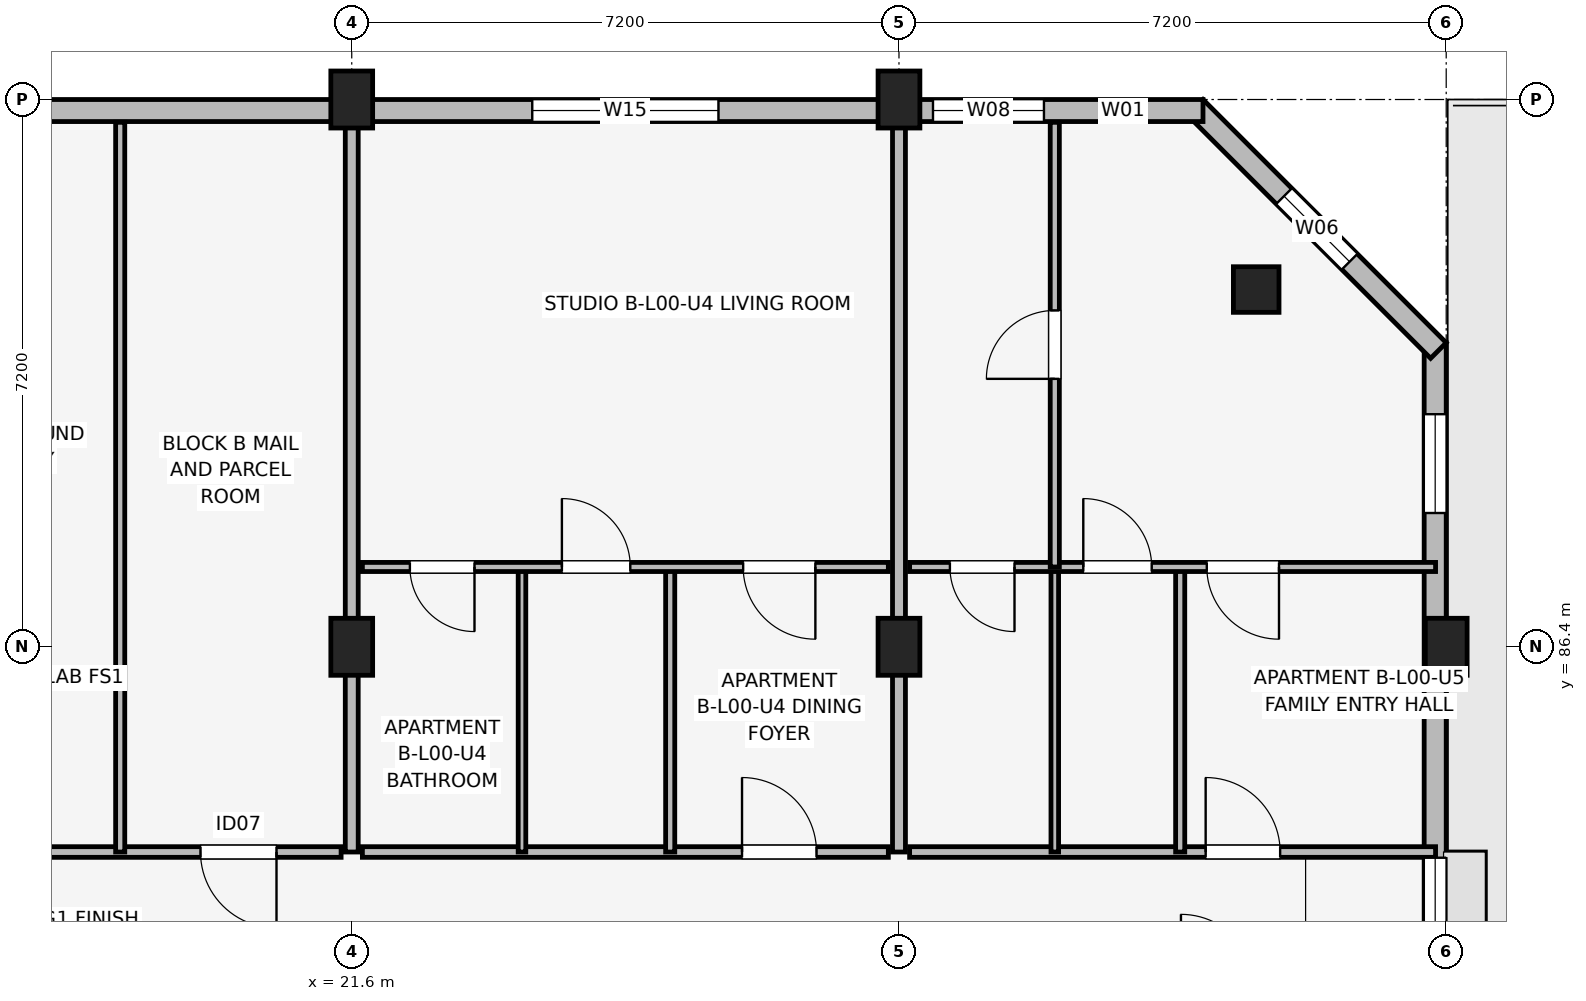
"""IFC4 building model, lengths in metres.
Left out: names, types, materials, properties, quantities, classifications, styles, units other than length and angle.
Written with IfcOpenShell. Run it as: python <this file> out.ifc"""

import sys

from ifc_helpers import new_model, si_unit, direction, frame, frame_2d, origin, origin_2d, place, context, subcontext, project, spatial, rectangle, extrude, element, fill, save


model = new_model("IFC4")
c1 = context("Model", 3, precision=1e-05, world=origin(), true_north=direction((0.0, 1.0)))
c2 = subcontext(c1, "Body", "Model", "MODEL_VIEW")
j1 = project(units=[si_unit("LENGTHUNIT", "METRE"), si_unit("PLANEANGLEUNIT", "RADIAN")], contexts=[c1])
p1 = place(None, origin())
s1 = spatial("IfcSite", under=j1, at=p1, CompositionType="ELEMENT")
p2 = place(p1, origin())
s2 = spatial("IfcBuilding", under=s1, at=p2, CompositionType="ELEMENT")
p3 = place(p2, origin())
s3 = spatial("IfcBuildingStorey", under=s2, at=p3, CompositionType="ELEMENT", Elevation=0.0)
for number, where, z_axis, x_axis in (
    (1, (21.6, 86.4, 0.0), (0.0, 0.0, 1.0), (1.0, 0.0, 0.0)),
    (2, (21.6, 93.6, 0.0), (0.0, 0.0, 1.0), (1.0, 0.0, 0.0)),
    (3, (28.8, 86.4, 0.0), (0.0, 0.0, 1.0), (1.0, 0.0, 0.0)),
    (4, (28.8, 93.6, 0.0), (0.0, 0.0, 1.0), (1.0, 0.0, 0.0)),
    (5, (36.0, 86.4, 0.0), (0.0, 0.0, 1.0), (1.0, 0.0, 0.0)),
):
    element("IfcColumn", number, at=place(p3, frame(where, z_axis=z_axis, x_axis=x_axis)), inside=s3, PredefinedType="COLUMN", context=c2, shape_type="SweptSolid", body=[
        extrude(rectangle(XDim=0.55, YDim=0.75, at=origin_2d()), origin(), (0.0, 0.0, 1.0), 4.5),
    ])
p4 = place(p3, frame((33.5, 91.1, 0.0), z_axis=(0.0, 0.0, 1.0), x_axis=(1.0, 0.0, 0.0)))
e6 = element("IfcColumn", 6, at=p4, inside=s3, PredefinedType="COLUMN", context=c2, shape_type="SweptSolid", body=[
    extrude(rectangle(XDim=0.6, YDim=0.6, at=origin_2d()), origin(), (0.0, 0.0, 1.0), 4.5),
])
p5 = place(p3, frame((35.855, 75.2, 0.0), z_axis=(0.0, 0.0, 1.0), x_axis=(0.0, 1.0, 0.0)))
e7 = element("IfcWall", 7, at=p5, inside=s3, PredefinedType="SOLIDWALL", context=c2, shape_type="SweptSolid", body=[
    extrude(rectangle(XDim=15.2, YDim=0.29, at=frame_2d((7.6, 0.0))), origin(), (0.0, 0.0, 1.0), 3.48),
])
p6 = place(p5, frame((6.775, 0.0, 1.05)))
e8 = element("IfcOpeningElement", 8, at=p6, cuts=e7, PredefinedType="OPENING", context=c2, shape_type="SweptSolid", body=[
    extrude(rectangle(XDim=1.65, YDim=1.15, at=frame_2d((0.825, 0.575))), frame((0.0, 0.155, 0.0), z_axis=(0.0, -1.0, 0.0), x_axis=(1.0, 0.0, 0.0)), (0.0, 0.0, 1.0), 0.31),
])
p7 = place(p5, frame((12.96, 0.0, 0.75)))
e9 = element("IfcOpeningElement", 9, at=p7, cuts=e7, PredefinedType="OPENING", context=c2, shape_type="SweptSolid", body=[
    extrude(rectangle(XDim=1.3, YDim=1.55, at=frame_2d((0.65, 0.775))), frame((0.0, 0.155, 0.0), z_axis=(0.0, -1.0, 0.0), x_axis=(1.0, 0.0, 0.0)), (0.0, 0.0, 1.0), 0.31),
])
p8 = place(p3, frame((35.897, 90.298, 0.0), z_axis=(0.0, 0.0, 1.0), x_axis=(-0.707106781187, 0.707106781187, 0.0)))
e10 = element("IfcWall", 10, at=p8, inside=s3, PredefinedType="SOLIDWALL", context=c2, shape_type="SweptSolid", body=[
    extrude(rectangle(XDim=4.525, YDim=0.29, at=frame_2d((2.263, 0.0))), origin(), (0.0, 0.0, 1.0), 4.175),
])
p9 = place(p8, frame((1.653, 0.0, 0.85)))
e11 = element("IfcOpeningElement", 11, at=p9, cuts=e10, PredefinedType="OPENING", context=c2, shape_type="SweptSolid", body=[
    extrude(rectangle(XDim=1.22, YDim=1.5, at=frame_2d((0.61, 0.75))), frame((0.0, 0.155, 0.0), z_axis=(0.0, -1.0, 0.0), x_axis=(1.0, 0.0, 0.0)), (0.0, 0.0, 1.0), 0.31),
])
p10 = place(p3, frame((32.8, 93.455, 0.0), z_axis=(0.0, 0.0, 1.0), x_axis=(-1.0, 0.0, 0.0)))
e12 = element("IfcWall", 12, at=p10, inside=s3, PredefinedType="SOLIDWALL", context=c2, shape_type="SweptSolid", body=[
    extrude(rectangle(XDim=29.6, YDim=0.29, at=frame_2d((14.8, 0.0))), origin(), (0.0, 0.0, 1.0), 3.48),
])
p11 = place(p10, frame((17.25, 0.0, 0.0), z_axis=(0.0, 0.0, 1.0), x_axis=(-1.0, 0.0, 0.0)))
e13 = element("IfcOpeningElement", 13, at=p11, cuts=e12, PredefinedType="OPENING", context=c2, shape_type="SweptSolid", body=[
    extrude(rectangle(XDim=1.8, YDim=2.4, at=frame_2d((0.9, 1.2))), frame((0.0, 0.155, 0.0), z_axis=(0.0, -1.0, 0.0), x_axis=(1.0, 0.0, 0.0)), (0.0, 0.0, 1.0), 0.31),
])
p12 = place(p10, frame((26.157, 0.0, 0.75)))
e14 = element("IfcOpeningElement", 14, at=p12, cuts=e12, PredefinedType="OPENING", context=c2, shape_type="SweptSolid", body=[
    extrude(rectangle(XDim=0.98, YDim=1.45, at=frame_2d((0.49, 0.725))), frame((0.0, 0.155, 0.0), z_axis=(0.0, -1.0, 0.0), x_axis=(1.0, 0.0, 0.0)), (0.0, 0.0, 1.0), 0.31),
])
p13 = place(p10, frame((23.778, 0.0, 0.75)))
e15 = element("IfcOpeningElement", 15, at=p13, cuts=e12, PredefinedType="OPENING", context=c2, shape_type="SweptSolid", body=[
    extrude(rectangle(XDim=1.1, YDim=1.5, at=frame_2d((0.55, 0.75))), frame((0.0, 0.155, 0.0), z_axis=(0.0, -1.0, 0.0), x_axis=(1.0, 0.0, 0.0)), (0.0, 0.0, 1.0), 0.31),
])
p14 = place(p10, frame((19.883, 0.0, 0.7)))
e16 = element("IfcOpeningElement", 16, at=p14, cuts=e12, PredefinedType="OPENING", context=c2, shape_type="SweptSolid", body=[
    extrude(rectangle(XDim=2.3, YDim=1.65, at=frame_2d((1.15, 0.825))), frame((0.0, 0.155, 0.0), z_axis=(0.0, -1.0, 0.0), x_axis=(1.0, 0.0, 0.0)), (0.0, 0.0, 1.0), 0.31),
])
p15 = place(p10, frame((6.375, 0.0, 0.7)))
e17 = element("IfcOpeningElement", 17, at=p15, cuts=e12, PredefinedType="OPENING", context=c2, shape_type="SweptSolid", body=[
    extrude(rectangle(XDim=2.45, YDim=1.65, at=frame_2d((1.225, 0.825))), frame((0.0, 0.155, 0.0), z_axis=(0.0, -1.0, 0.0), x_axis=(1.0, 0.0, 0.0)), (0.0, 0.0, 1.0), 0.31),
])
p16 = place(p10, frame((2.093, 0.0, 0.75)))
e18 = element("IfcOpeningElement", 18, at=p16, cuts=e12, PredefinedType="OPENING", context=c2, shape_type="SweptSolid", body=[
    extrude(rectangle(XDim=1.46, YDim=1.55, at=frame_2d((0.73, 0.775))), frame((0.0, 0.155, 0.0), z_axis=(0.0, -1.0, 0.0), x_axis=(1.0, 0.0, 0.0)), (0.0, 0.0, 1.0), 0.31),
])
p17 = place(p10, frame((0.755, 0.0, 0.75)))
e19 = element("IfcOpeningElement", 19, at=p17, cuts=e12, PredefinedType="OPENING", context=c2, shape_type="SweptSolid", body=[
    extrude(rectangle(XDim=0.6, YDim=1.25, at=frame_2d((0.3, 0.625))), frame((0.0, 0.155, 0.0), z_axis=(0.0, -1.0, 0.0), x_axis=(1.0, 0.0, 0.0)), (0.0, 0.0, 1.0), 0.31),
])
p18 = place(p3, frame((14.54, 83.7, 0.0), z_axis=(0.0, 0.0, 1.0), x_axis=(1.0, 0.0, 0.0)))
e20 = element("IfcWall", 20, at=p18, inside=s3, PredefinedType="PARTITIONING", context=c2, shape_type="SweptSolid", body=[
    extrude(rectangle(XDim=6.92, YDim=0.14, at=frame_2d((3.46, 0.0))), origin(), (0.0, 0.0, 1.0), 3.15),
])
p19 = place(p18, frame((1.25, 0.0, 0.0)))
e21 = element("IfcOpeningElement", 21, at=p19, cuts=e20, PredefinedType="OPENING", context=c2, shape_type="SweptSolid", body=[
    extrude(rectangle(XDim=1.4, YDim=2.22, at=frame_2d((0.7, 1.11))), frame((0.0, 0.08, 0.0), z_axis=(0.0, -1.0, 0.0), x_axis=(1.0, 0.0, 0.0)), (0.0, 0.0, 1.0), 0.16),
])
p20 = place(p18, frame((6.07, 0.0, 0.0), z_axis=(0.0, 0.0, 1.0), x_axis=(-1.0, 0.0, 0.0)))
e22 = element("IfcOpeningElement", 22, at=p20, cuts=e20, PredefinedType="OPENING", context=c2, shape_type="SweptSolid", body=[
    extrude(rectangle(XDim=1.0, YDim=2.12, at=frame_2d((0.5, 1.06))), frame((0.0, 0.08, 0.0), z_axis=(0.0, -1.0, 0.0), x_axis=(1.0, 0.0, 0.0)), (0.0, 0.0, 1.0), 0.16),
])
p21 = place(p3, frame((18.554, 83.7, 0.0), z_axis=(0.0, 0.0, 1.0), x_axis=(0.0, 1.0, 0.0)))
e23 = element("IfcWall", 23, at=p21, inside=s3, PredefinedType="PARTITIONING", context=c2, shape_type="SweptSolid", body=[
    extrude(rectangle(XDim=9.6, YDim=0.12, at=frame_2d((4.8, 0.0))), origin(), (0.0, 0.0, 1.0), 3.15),
])
p22 = place(p3, frame((21.6, 83.7, 0.0), z_axis=(0.0, 0.0, 1.0), x_axis=(0.0, 1.0, 0.0)))
e24 = element("IfcWall", 24, at=p22, inside=s3, PredefinedType="PARTITIONING", context=c2, shape_type="SweptSolid", body=[
    extrude(rectangle(XDim=9.6, YDim=0.17, at=frame_2d((4.8, 0.0))), origin(), (0.0, 0.0, 1.0), 3.15),
])
p23 = place(p3, frame((21.74, 83.7, 0.0), z_axis=(0.0, 0.0, 1.0), x_axis=(1.0, 0.0, 0.0)))
e25 = element("IfcWall", 25, at=p23, inside=s3, PredefinedType="PARTITIONING", context=c2, shape_type="SweptSolid", body=[
    extrude(rectangle(XDim=6.92, YDim=0.14, at=frame_2d((3.46, 0.0))), origin(), (0.0, 0.0, 1.0), 3.15),
])
p24 = place(p23, frame((4.995, 0.0, 0.0)))
e26 = element("IfcOpeningElement", 26, at=p24, cuts=e25, PredefinedType="OPENING", context=c2, shape_type="SweptSolid", body=[
    extrude(rectangle(XDim=0.98, YDim=2.1, at=frame_2d((0.49, 1.05))), frame((0.0, 0.08, 0.0), z_axis=(0.0, -1.0, 0.0), x_axis=(1.0, 0.0, 0.0)), (0.0, 0.0, 1.0), 0.16),
])
p25 = place(p3, frame((23.84, 83.7, 0.0), z_axis=(0.0, 0.0, 1.0), x_axis=(0.0, 1.0, 0.0)))
e27 = element("IfcWall", 27, at=p25, inside=s3, PredefinedType="PARTITIONING", context=c2, shape_type="SweptSolid", body=[
    extrude(rectangle(XDim=3.75, YDim=0.1, at=frame_2d((1.875, 0.0))), origin(), (0.0, 0.0, 1.0), 3.15),
])
p26 = place(p3, frame((25.79, 83.7, 0.0), z_axis=(0.0, 0.0, 1.0), x_axis=(0.0, 1.0, 0.0)))
e28 = element("IfcWall", 28, at=p26, inside=s3, PredefinedType="PARTITIONING", context=c2, shape_type="SweptSolid", body=[
    extrude(rectangle(XDim=3.75, YDim=0.12, at=frame_2d((1.875, 0.0))), origin(), (0.0, 0.0, 1.0), 3.15),
])
p27 = place(p3, frame((21.74, 87.45, 0.0), z_axis=(0.0, 0.0, 1.0), x_axis=(1.0, 0.0, 0.0)))
e29 = element("IfcWall", 29, at=p27, inside=s3, PredefinedType="PARTITIONING", context=c2, shape_type="SweptSolid", body=[
    extrude(rectangle(XDim=6.92, YDim=0.12, at=frame_2d((3.46, 0.0))), origin(), (0.0, 0.0, 1.0), 3.15),
])
p28 = place(p27, frame((1.475, 0.0, 0.0), z_axis=(0.0, 0.0, 1.0), x_axis=(-1.0, 0.0, 0.0)))
e30 = element("IfcOpeningElement", 30, at=p28, cuts=e29, PredefinedType="OPENING", context=c2, shape_type="SweptSolid", body=[
    extrude(rectangle(XDim=0.85, YDim=2.08, at=frame_2d((0.425, 1.04))), frame((0.0, 0.07, 0.0), z_axis=(0.0, -1.0, 0.0), x_axis=(1.0, 0.0, 0.0)), (0.0, 0.0, 1.0), 0.14),
])
p29 = place(p27, frame((2.625, 0.0, 0.0)))
e31 = element("IfcOpeningElement", 31, at=p29, cuts=e29, PredefinedType="OPENING", context=c2, shape_type="SweptSolid", body=[
    extrude(rectangle(XDim=0.9, YDim=2.08, at=frame_2d((0.45, 1.04))), frame((0.0, 0.07, 0.0), z_axis=(0.0, -1.0, 0.0), x_axis=(1.0, 0.0, 0.0)), (0.0, 0.0, 1.0), 0.14),
])
p30 = place(p27, frame((5.96, 0.0, 0.0), z_axis=(0.0, 0.0, 1.0), x_axis=(-1.0, 0.0, 0.0)))
e32 = element("IfcOpeningElement", 32, at=p30, cuts=e29, PredefinedType="OPENING", context=c2, shape_type="SweptSolid", body=[
    extrude(rectangle(XDim=0.95, YDim=2.08, at=frame_2d((0.475, 1.04))), frame((0.0, 0.07, 0.0), z_axis=(0.0, -1.0, 0.0), x_axis=(1.0, 0.0, 0.0)), (0.0, 0.0, 1.0), 0.14),
])
p31 = place(p3, frame((28.8, 83.7, 0.0), z_axis=(0.0, 0.0, 1.0), x_axis=(0.0, 1.0, 0.0)))
e33 = element("IfcWall", 33, at=p31, inside=s3, PredefinedType="PARTITIONING", context=c2, shape_type="SweptSolid", body=[
    extrude(rectangle(XDim=9.6, YDim=0.17, at=frame_2d((4.8, 0.0))), origin(), (0.0, 0.0, 1.0), 3.15),
])
p32 = place(p3, frame((28.94, 83.7, 0.0), z_axis=(0.0, 0.0, 1.0), x_axis=(1.0, 0.0, 0.0)))
e34 = element("IfcWall", 34, at=p32, inside=s3, PredefinedType="PARTITIONING", context=c2, shape_type="SweptSolid", body=[
    extrude(rectangle(XDim=6.92, YDim=0.14, at=frame_2d((3.46, 0.0))), origin(), (0.0, 0.0, 1.0), 3.15),
])
p33 = place(p32, frame((3.895, 0.0, 0.0)))
e35 = element("IfcOpeningElement", 35, at=p33, cuts=e34, PredefinedType="OPENING", context=c2, shape_type="SweptSolid", body=[
    extrude(rectangle(XDim=0.98, YDim=2.1, at=frame_2d((0.49, 1.05))), frame((0.0, 0.08, 0.0), z_axis=(0.0, -1.0, 0.0), x_axis=(1.0, 0.0, 0.0)), (0.0, 0.0, 1.0), 0.16),
])
p34 = place(p3, frame((30.85, 83.7, 0.0), z_axis=(0.0, 0.0, 1.0), x_axis=(0.0, 1.0, 0.0)))
e36 = element("IfcWall", 36, at=p34, inside=s3, PredefinedType="PARTITIONING", context=c2, shape_type="SweptSolid", body=[
    extrude(rectangle(XDim=3.75, YDim=0.1, at=frame_2d((1.875, 0.0))), origin(), (0.0, 0.0, 1.0), 3.15),
])
p35 = place(p3, frame((32.5, 83.7, 0.0), z_axis=(0.0, 0.0, 1.0), x_axis=(0.0, 1.0, 0.0)))
e37 = element("IfcWall", 37, at=p35, inside=s3, PredefinedType="PARTITIONING", context=c2, shape_type="SweptSolid", body=[
    extrude(rectangle(XDim=3.75, YDim=0.12, at=frame_2d((1.875, 0.0))), origin(), (0.0, 0.0, 1.0), 3.15),
])
p36 = place(p3, frame((28.94, 87.45, 0.0), z_axis=(0.0, 0.0, 1.0), x_axis=(1.0, 0.0, 0.0)))
e38 = element("IfcWall", 38, at=p36, inside=s3, PredefinedType="PARTITIONING", context=c2, shape_type="SweptSolid", body=[
    extrude(rectangle(XDim=6.92, YDim=0.12, at=frame_2d((3.46, 0.0))), origin(), (0.0, 0.0, 1.0), 3.15),
])
p37 = place(p36, frame((1.38, 0.0, 0.0), z_axis=(0.0, 0.0, 1.0), x_axis=(-1.0, 0.0, 0.0)))
e39 = element("IfcOpeningElement", 39, at=p37, cuts=e38, PredefinedType="OPENING", context=c2, shape_type="SweptSolid", body=[
    extrude(rectangle(XDim=0.85, YDim=2.08, at=frame_2d((0.425, 1.04))), frame((0.0, 0.07, 0.0), z_axis=(0.0, -1.0, 0.0), x_axis=(1.0, 0.0, 0.0)), (0.0, 0.0, 1.0), 0.14),
])
p38 = place(p36, frame((2.285, 0.0, 0.0)))
e40 = element("IfcOpeningElement", 40, at=p38, cuts=e38, PredefinedType="OPENING", context=c2, shape_type="SweptSolid", body=[
    extrude(rectangle(XDim=0.9, YDim=2.08, at=frame_2d((0.45, 1.04))), frame((0.0, 0.07, 0.0), z_axis=(0.0, -1.0, 0.0), x_axis=(1.0, 0.0, 0.0)), (0.0, 0.0, 1.0), 0.14),
])
p39 = place(p36, frame((4.86, 0.0, 0.0), z_axis=(0.0, 0.0, 1.0), x_axis=(-1.0, 0.0, 0.0)))
e41 = element("IfcOpeningElement", 41, at=p39, cuts=e38, PredefinedType="OPENING", context=c2, shape_type="SweptSolid", body=[
    extrude(rectangle(XDim=0.95, YDim=2.08, at=frame_2d((0.475, 1.04))), frame((0.0, 0.07, 0.0), z_axis=(0.0, -1.0, 0.0), x_axis=(1.0, 0.0, 0.0)), (0.0, 0.0, 1.0), 0.14),
])
p40 = place(p3, frame((30.85, 87.45, 0.0), z_axis=(0.0, 0.0, 1.0), x_axis=(0.0, 1.0, 0.0)))
e42 = element("IfcWall", 42, at=p40, inside=s3, PredefinedType="PARTITIONING", context=c2, shape_type="SweptSolid", body=[
    extrude(rectangle(XDim=5.85, YDim=0.12, at=frame_2d((2.925, 0.0))), origin(), (0.0, 0.0, 1.0), 3.15),
])
p41 = place(p40, frame((2.475, 0.0, 0.0)))
e43 = element("IfcOpeningElement", 43, at=p41, cuts=e42, PredefinedType="OPENING", context=c2, shape_type="SweptSolid", body=[
    extrude(rectangle(XDim=0.9, YDim=2.08, at=frame_2d((0.45, 1.04))), frame((0.0, 0.07, 0.0), z_axis=(0.0, -1.0, 0.0), x_axis=(1.0, 0.0, 0.0)), (0.0, 0.0, 1.0), 0.14),
])
p42 = place(p9, origin())
e44 = element("IfcWindow", 44, at=p42, inside=s3, PartitioningType="SINGLE_PANEL", PredefinedType="WINDOW", context=c2, shape_type="SweptSolid", body=[
    extrude(rectangle(XDim=1.22, YDim=1.5, at=frame_2d((0.61, 0.75))), frame((0.0, 0.03, 0.0), z_axis=(0.0, -1.0, 0.0), x_axis=(1.0, 0.0, 0.0)), (0.0, 0.0, 1.0), 0.06),
])
fill(e11, e44)
p43 = place(p15, origin())
e45 = element("IfcWindow", 45, at=p43, inside=s3, PartitioningType="SINGLE_PANEL", PredefinedType="WINDOW", context=c2, shape_type="SweptSolid", body=[
    extrude(rectangle(XDim=2.45, YDim=1.65, at=frame_2d((1.225, 0.825))), frame((0.0, 0.03, 0.0), z_axis=(0.0, -1.0, 0.0), x_axis=(1.0, 0.0, 0.0)), (0.0, 0.0, 1.0), 0.06),
])
fill(e17, e45)
p44 = place(p16, origin())
e46 = element("IfcWindow", 46, at=p44, inside=s3, PartitioningType="SINGLE_PANEL", PredefinedType="WINDOW", context=c2, shape_type="SweptSolid", body=[
    extrude(rectangle(XDim=1.46, YDim=1.55, at=frame_2d((0.73, 0.775))), frame((0.0, 0.03, 0.0), z_axis=(0.0, -1.0, 0.0), x_axis=(1.0, 0.0, 0.0)), (0.0, 0.0, 1.0), 0.06),
])
fill(e18, e46)
p45 = place(p17, origin())
e47 = element("IfcWindow", 47, at=p45, inside=s3, PartitioningType="SINGLE_PANEL", PredefinedType="WINDOW", context=c2, shape_type="SweptSolid", body=[
    extrude(rectangle(XDim=0.6, YDim=1.25, at=frame_2d((0.3, 0.625))), frame((0.0, 0.03, 0.0), z_axis=(0.0, -1.0, 0.0), x_axis=(1.0, 0.0, 0.0)), (0.0, 0.0, 1.0), 0.06),
])
fill(e19, e47)
p46 = place(p6, origin())
e48 = element("IfcWindow", 48, at=p46, inside=s3, PartitioningType="SINGLE_PANEL", PredefinedType="WINDOW", context=c2, shape_type="SweptSolid", body=[
    extrude(rectangle(XDim=1.65, YDim=1.15, at=frame_2d((0.825, 0.575))), frame((0.0, 0.03, 0.0), z_axis=(0.0, -1.0, 0.0), x_axis=(1.0, 0.0, 0.0)), (0.0, 0.0, 1.0), 0.06),
])
fill(e8, e48)
p47 = place(p7, origin())
e49 = element("IfcWindow", 49, at=p47, inside=s3, PartitioningType="SINGLE_PANEL", PredefinedType="WINDOW", context=c2, shape_type="SweptSolid", body=[
    extrude(rectangle(XDim=1.3, YDim=1.55, at=frame_2d((0.65, 0.775))), frame((0.0, 0.03, 0.0), z_axis=(0.0, -1.0, 0.0), x_axis=(1.0, 0.0, 0.0)), (0.0, 0.0, 1.0), 0.06),
])
fill(e9, e49)
p48 = place(p20, origin())
e50 = element("IfcDoor", 50, at=p48, inside=s3, OperationType="SINGLE_SWING_RIGHT", PredefinedType="DOOR", context=c2, shape_type="SweptSolid", body=[
    extrude(rectangle(XDim=1.0, YDim=2.12, at=frame_2d((0.5, 1.06))), frame((0.0, 0.025, 0.0), z_axis=(0.0, -1.0, 0.0), x_axis=(1.0, 0.0, 0.0)), (0.0, 0.0, 1.0), 0.05),
])
fill(e22, e50)
p49 = place(p24, origin())
e51 = element("IfcDoor", 51, at=p49, inside=s3, OperationType="SINGLE_SWING_LEFT", PredefinedType="DOOR", context=c2, shape_type="SweptSolid", body=[
    extrude(rectangle(XDim=0.98, YDim=2.1, at=frame_2d((0.49, 1.05))), frame((0.0, 0.025, 0.0), z_axis=(0.0, -1.0, 0.0), x_axis=(1.0, 0.0, 0.0)), (0.0, 0.0, 1.0), 0.05),
])
fill(e26, e51)
p50 = place(p28, origin())
e52 = element("IfcDoor", 52, at=p50, inside=s3, OperationType="SINGLE_SWING_RIGHT", PredefinedType="DOOR", context=c2, shape_type="SweptSolid", body=[
    extrude(rectangle(XDim=0.85, YDim=2.08, at=frame_2d((0.425, 1.04))), frame((0.0, 0.025, 0.0), z_axis=(0.0, -1.0, 0.0), x_axis=(1.0, 0.0, 0.0)), (0.0, 0.0, 1.0), 0.05),
])
fill(e30, e52)
p51 = place(p29, origin())
e53 = element("IfcDoor", 53, at=p51, inside=s3, OperationType="SINGLE_SWING_LEFT", PredefinedType="DOOR", context=c2, shape_type="SweptSolid", body=[
    extrude(rectangle(XDim=0.9, YDim=2.08, at=frame_2d((0.45, 1.04))), frame((0.0, 0.025, 0.0), z_axis=(0.0, -1.0, 0.0), x_axis=(1.0, 0.0, 0.0)), (0.0, 0.0, 1.0), 0.05),
])
fill(e31, e53)
p52 = place(p30, origin())
e54 = element("IfcDoor", 54, at=p52, inside=s3, OperationType="SINGLE_SWING_RIGHT", PredefinedType="DOOR", context=c2, shape_type="SweptSolid", body=[
    extrude(rectangle(XDim=0.95, YDim=2.08, at=frame_2d((0.475, 1.04))), frame((0.0, 0.025, 0.0), z_axis=(0.0, -1.0, 0.0), x_axis=(1.0, 0.0, 0.0)), (0.0, 0.0, 1.0), 0.05),
])
fill(e32, e54)
p53 = place(p33, origin())
e55 = element("IfcDoor", 55, at=p53, inside=s3, OperationType="SINGLE_SWING_LEFT", PredefinedType="DOOR", context=c2, shape_type="SweptSolid", body=[
    extrude(rectangle(XDim=0.98, YDim=2.1, at=frame_2d((0.49, 1.05))), frame((0.0, 0.025, 0.0), z_axis=(0.0, -1.0, 0.0), x_axis=(1.0, 0.0, 0.0)), (0.0, 0.0, 1.0), 0.05),
])
fill(e35, e55)
p54 = place(p37, origin())
e56 = element("IfcDoor", 56, at=p54, inside=s3, OperationType="SINGLE_SWING_RIGHT", PredefinedType="DOOR", context=c2, shape_type="SweptSolid", body=[
    extrude(rectangle(XDim=0.85, YDim=2.08, at=frame_2d((0.425, 1.04))), frame((0.0, 0.025, 0.0), z_axis=(0.0, -1.0, 0.0), x_axis=(1.0, 0.0, 0.0)), (0.0, 0.0, 1.0), 0.05),
])
fill(e39, e56)
p55 = place(p38, origin())
e57 = element("IfcDoor", 57, at=p55, inside=s3, OperationType="SINGLE_SWING_LEFT", PredefinedType="DOOR", context=c2, shape_type="SweptSolid", body=[
    extrude(rectangle(XDim=0.9, YDim=2.08, at=frame_2d((0.45, 1.04))), frame((0.0, 0.025, 0.0), z_axis=(0.0, -1.0, 0.0), x_axis=(1.0, 0.0, 0.0)), (0.0, 0.0, 1.0), 0.05),
])
fill(e40, e57)
p56 = place(p39, origin())
e58 = element("IfcDoor", 58, at=p56, inside=s3, OperationType="SINGLE_SWING_RIGHT", PredefinedType="DOOR", context=c2, shape_type="SweptSolid", body=[
    extrude(rectangle(XDim=0.95, YDim=2.08, at=frame_2d((0.475, 1.04))), frame((0.0, 0.025, 0.0), z_axis=(0.0, -1.0, 0.0), x_axis=(1.0, 0.0, 0.0)), (0.0, 0.0, 1.0), 0.05),
])
fill(e41, e58)
p57 = place(p41, origin())
e59 = element("IfcDoor", 59, at=p57, inside=s3, OperationType="SINGLE_SWING_LEFT", PredefinedType="DOOR", context=c2, shape_type="SweptSolid", body=[
    extrude(rectangle(XDim=0.9, YDim=2.08, at=frame_2d((0.45, 1.04))), frame((0.0, 0.025, 0.0), z_axis=(0.0, -1.0, 0.0), x_axis=(1.0, 0.0, 0.0)), (0.0, 0.0, 1.0), 0.05),
])
fill(e43, e59)
save(model, sys.argv[1])
